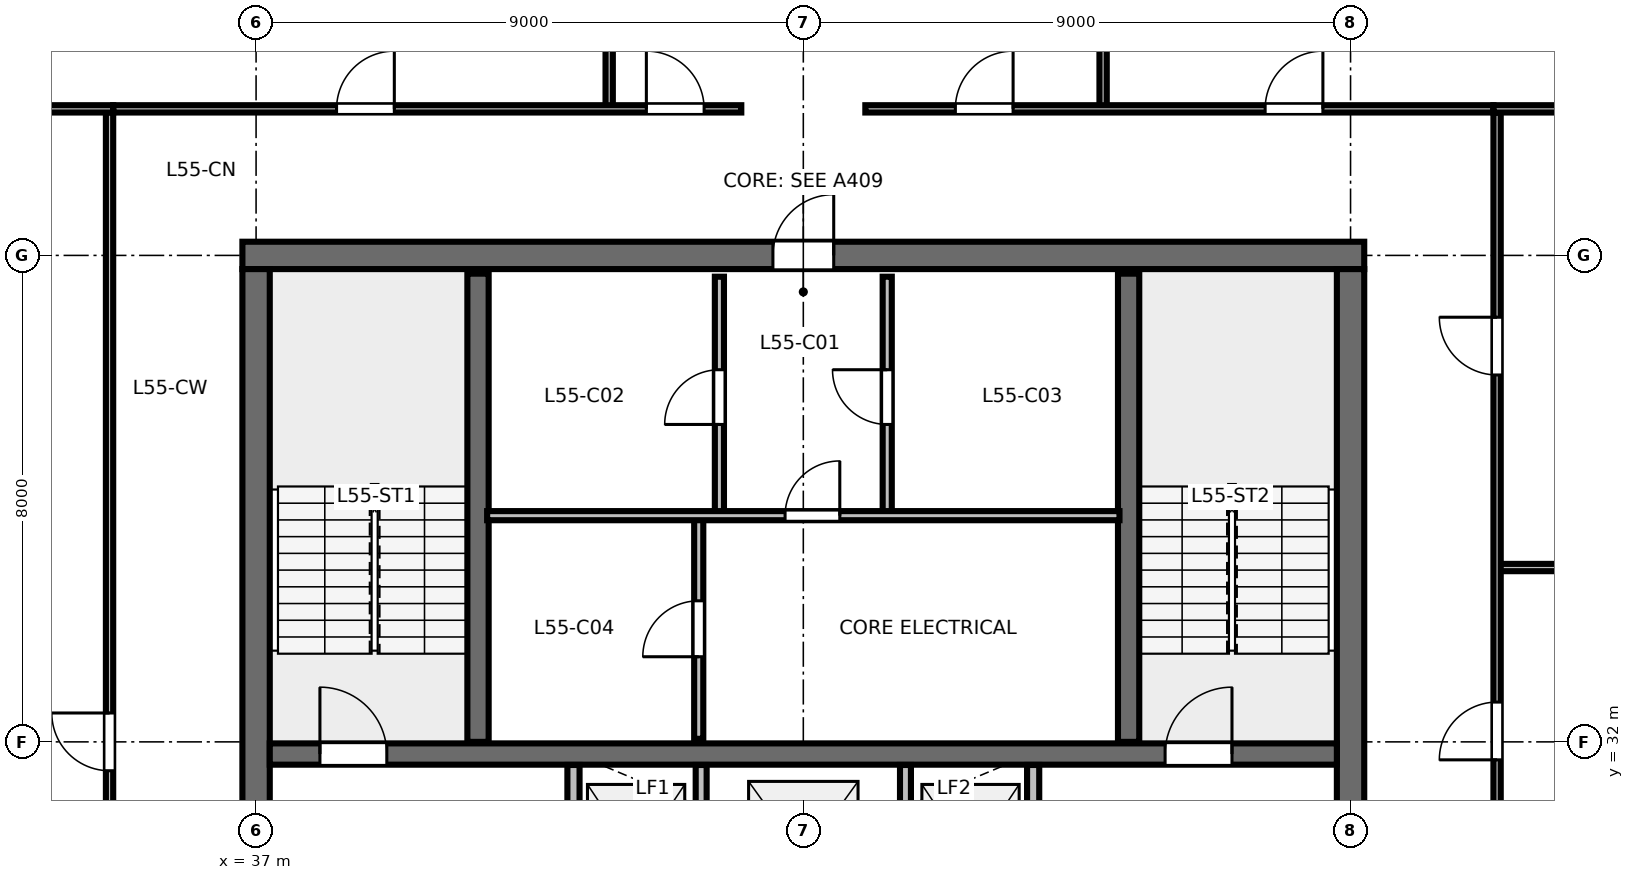
"""IFC4 building model, lengths in metres.
Left out: names, types, materials, properties, quantities, classifications, styles, units other than length and angle.
Written with IfcOpenShell. Run it as: python <this file> out.ifc"""

import sys

from ifc_helpers import new_model, si_unit, direction, frame, frame_2d, origin, place, context, subcontext, project, spatial, rectangle, extrude, element, fill, save


model = new_model("IFC4")
c1 = context("Model", 3, precision=1e-05, world=origin(), true_north=direction((0.0, 1.0)))
c2 = subcontext(c1, "Body", "Model", "MODEL_VIEW")
j1 = project(units=[si_unit("LENGTHUNIT", "METRE"), si_unit("PLANEANGLEUNIT", "RADIAN")], contexts=[c1])
p1 = place(None, origin())
s1 = spatial("IfcSite", under=j1, at=p1, CompositionType="ELEMENT")
p2 = place(p1, origin())
s2 = spatial("IfcBuilding", under=s1, at=p2, CompositionType="ELEMENT")
p3 = place(p2, frame((0.0, 0.0, 209.4)))
s3 = spatial("IfcBuildingStorey", under=s2, at=p3, CompositionType="ELEMENT", Elevation=209.4)
p4 = place(p3, frame((36.775, 40.0, 0.0), z_axis=(0.0, 0.0, 1.0), x_axis=(1.0, 0.0, 0.0)))
e1 = element("IfcWall", 1, at=p4, inside=s3, PredefinedType="SHEAR", context=c2, shape_type="SweptSolid", body=[
    extrude(rectangle(XDim=18.45, YDim=0.45, at=frame_2d((9.225, 0.0))), origin(), (0.0, 0.0, 1.0), 3.36),
])
p5 = place(p4, frame((8.725, 0.0, 0.0)))
e2 = element("IfcOpeningElement", 2, at=p5, cuts=e1, PredefinedType="OPENING", context=c2, shape_type="SweptSolid", body=[
    extrude(rectangle(XDim=1.0, YDim=2.15, at=frame_2d((0.5, 1.075))), frame((0.0, 0.235, 0.0), z_axis=(0.0, -1.0, 0.0), x_axis=(1.0, 0.0, 0.0)), (0.0, 0.0, 1.0), 0.47),
])
p6 = place(p3, frame((37.0, 24.225, 0.0), z_axis=(0.0, 0.0, 1.0), x_axis=(0.0, 1.0, 0.0)))
e3 = element("IfcWall", 3, at=p6, inside=s3, PredefinedType="SHEAR", context=c2, shape_type="SweptSolid", body=[
    extrude(rectangle(XDim=15.55, YDim=0.45, at=frame_2d((7.775, 0.0))), origin(), (0.0, 0.0, 1.0), 3.36),
])
p7 = place(p6, frame((5.3, 0.0, 0.0)))
e4 = element("IfcOpeningElement", 4, at=p7, cuts=e3, PredefinedType="OPENING", context=c2, shape_type="SweptSolid", body=[
    extrude(rectangle(XDim=1.15, YDim=2.15, at=frame_2d((0.575, 1.075))), frame((0.0, 0.235, 0.0), z_axis=(0.0, -1.0, 0.0), x_axis=(1.0, 0.0, 0.0)), (0.0, 0.0, 1.0), 0.47),
])
p8 = place(p3, frame((55.0, 24.225, 0.0), z_axis=(0.0, 0.0, 1.0), x_axis=(0.0, 1.0, 0.0)))
e5 = element("IfcWall", 5, at=p8, inside=s3, PredefinedType="SHEAR", context=c2, shape_type="SweptSolid", body=[
    extrude(rectangle(XDim=15.55, YDim=0.45, at=frame_2d((7.775, 0.0))), origin(), (0.0, 0.0, 1.0), 3.36),
])
p9 = place(p8, frame((5.3, 0.0, 0.0)))
e6 = element("IfcOpeningElement", 6, at=p9, cuts=e5, PredefinedType="OPENING", context=c2, shape_type="SweptSolid", body=[
    extrude(rectangle(XDim=1.15, YDim=2.15, at=frame_2d((0.575, 1.075))), frame((0.0, 0.235, 0.0), z_axis=(0.0, -1.0, 0.0), x_axis=(1.0, 0.0, 0.0)), (0.0, 0.0, 1.0), 0.47),
])
p10 = place(p3, frame((37.225, 31.8, 0.0), z_axis=(0.0, 0.0, 1.0), x_axis=(1.0, 0.0, 0.0)))
e7 = element("IfcWall", 7, at=p10, inside=s3, PredefinedType="SHEAR", context=c2, shape_type="SweptSolid", body=[
    extrude(rectangle(XDim=17.55, YDim=0.35, at=frame_2d((8.775, 0.0))), origin(), (0.0, 0.0, 1.0), 3.36),
])
p11 = place(p10, frame((0.825, 0.0, 0.0)))
e8 = element("IfcOpeningElement", 8, at=p11, cuts=e7, PredefinedType="OPENING", context=c2, shape_type="SweptSolid", body=[
    extrude(rectangle(XDim=1.1, YDim=2.15, at=frame_2d((0.55, 1.075))), frame((0.0, 0.185, 0.0), z_axis=(0.0, -1.0, 0.0), x_axis=(1.0, 0.0, 0.0)), (0.0, 0.0, 1.0), 0.37),
])
p12 = place(p10, frame((14.725, 0.0, 0.0)))
e9 = element("IfcOpeningElement", 9, at=p12, cuts=e7, PredefinedType="OPENING", context=c2, shape_type="SweptSolid", body=[
    extrude(rectangle(XDim=1.1, YDim=2.15, at=frame_2d((0.55, 1.075))), frame((0.0, 0.185, 0.0), z_axis=(0.0, -1.0, 0.0), x_axis=(1.0, 0.0, 0.0)), (0.0, 0.0, 1.0), 0.37),
])
for number, where, z_axis, x_axis in (
    (10, (40.65, 32.0, 0.0), (0.0, 0.0, 1.0), (0.0, 1.0, 0.0)),
    (11, (51.35, 32.0, 0.0), (0.0, 0.0, 1.0), (0.0, 1.0, 0.0)),
):
    element("IfcWall", number, at=place(p3, frame(where, z_axis=z_axis, x_axis=x_axis)), inside=s3, PredefinedType="SHEAR", context=c2, shape_type="SweptSolid", body=[
        extrude(rectangle(XDim=7.7, YDim=0.35, at=frame_2d((3.85, 0.0))), origin(), (0.0, 0.0, 1.0), 3.6),
    ])
p13 = place(p3, frame((44.62, 35.72, 0.0), z_axis=(0.0, 0.0, 1.0), x_axis=(0.0, 1.0, 0.0)))
e12 = element("IfcWall", 12, at=p13, inside=s3, PredefinedType="PARTITIONING", context=c2, shape_type="SweptSolid", body=[
    extrude(rectangle(XDim=3.93, YDim=0.15, at=frame_2d((1.965, 0.0))), origin(), (0.0, 0.0, 1.0), 3.375),
])
p14 = place(p13, frame((1.5, 0.0, 0.0)))
e13 = element("IfcOpeningElement", 13, at=p14, cuts=e12, PredefinedType="OPENING", context=c2, shape_type="SweptSolid", body=[
    extrude(rectangle(XDim=0.9, YDim=2.15, at=frame_2d((0.45, 1.075))), frame((0.0, 0.085, 0.0), z_axis=(0.0, -1.0, 0.0), x_axis=(1.0, 0.0, 0.0)), (0.0, 0.0, 1.0), 0.17),
])
p15 = place(p3, frame((47.38, 35.72, 0.0), z_axis=(0.0, 0.0, 1.0), x_axis=(0.0, 1.0, 0.0)))
e14 = element("IfcWall", 14, at=p15, inside=s3, PredefinedType="PARTITIONING", context=c2, shape_type="SweptSolid", body=[
    extrude(rectangle(XDim=3.93, YDim=0.15, at=frame_2d((1.965, 0.0))), origin(), (0.0, 0.0, 1.0), 3.375),
])
p16 = place(p15, frame((1.5, 0.0, 0.0)))
e15 = element("IfcOpeningElement", 15, at=p16, cuts=e14, PredefinedType="OPENING", context=c2, shape_type="SweptSolid", body=[
    extrude(rectangle(XDim=0.9, YDim=2.15, at=frame_2d((0.45, 1.075))), frame((0.0, 0.085, 0.0), z_axis=(0.0, -1.0, 0.0), x_axis=(1.0, 0.0, 0.0)), (0.0, 0.0, 1.0), 0.17),
])
p17 = place(p3, frame((44.28, 32.05, 0.0), z_axis=(0.0, 0.0, 1.0), x_axis=(0.0, 1.0, 0.0)))
e16 = element("IfcWall", 16, at=p17, inside=s3, PredefinedType="PARTITIONING", context=c2, shape_type="SweptSolid", body=[
    extrude(rectangle(XDim=3.67, YDim=0.15, at=frame_2d((1.835, 0.0))), origin(), (0.0, 0.0, 1.0), 3.375),
])
p18 = place(p17, frame((1.35, 0.0, 0.0)))
e17 = element("IfcOpeningElement", 17, at=p18, cuts=e16, PredefinedType="OPENING", context=c2, shape_type="SweptSolid", body=[
    extrude(rectangle(XDim=0.92, YDim=2.15, at=frame_2d((0.46, 1.075))), frame((0.0, 0.085, 0.0), z_axis=(0.0, -1.0, 0.0), x_axis=(1.0, 0.0, 0.0)), (0.0, 0.0, 1.0), 0.17),
])
p19 = place(p3, frame((40.8, 35.72, 0.0), z_axis=(0.0, 0.0, 1.0), x_axis=(1.0, 0.0, 0.0)))
e18 = element("IfcWall", 18, at=p19, inside=s3, PredefinedType="PARTITIONING", context=c2, shape_type="SweptSolid", body=[
    extrude(rectangle(XDim=10.4, YDim=0.15, at=frame_2d((5.2, 0.0))), origin(), (0.0, 0.0, 1.0), 3.375),
])
p20 = place(p19, frame((4.9, 0.0, 0.0)))
e19 = element("IfcOpeningElement", 19, at=p20, cuts=e18, PredefinedType="OPENING", context=c2, shape_type="SweptSolid", body=[
    extrude(rectangle(XDim=0.9, YDim=2.15, at=frame_2d((0.45, 1.075))), frame((0.0, 0.085, 0.0), z_axis=(0.0, -1.0, 0.0), x_axis=(1.0, 0.0, 0.0)), (0.0, 0.0, 1.0), 0.17),
])
p21 = place(p3, frame((42.22, 28.58, 0.0), z_axis=(0.0, 0.0, 1.0), x_axis=(0.0, 1.0, 0.0)))
e20 = element("IfcWall", 20, at=p21, inside=s3, PredefinedType="PARTITIONING", context=c2, shape_type="SweptSolid", body=[
    extrude(rectangle(XDim=3.04, YDim=0.2, at=frame_2d((1.52, 0.0))), origin(), (0.0, 0.0, 1.0), 3.375),
])
p22 = place(p21, frame((0.95, 0.0, 0.0)))
e21 = element("IfcOpeningElement", 21, at=p22, cuts=e20, PredefinedType="OPENING", context=c2, shape_type="SweptSolid", body=[
    extrude(rectangle(XDim=1.05, YDim=2.15, at=frame_2d((0.525, 1.075))), frame((0.0, 0.11, 0.0), z_axis=(0.0, -1.0, 0.0), x_axis=(1.0, 0.0, 0.0)), (0.0, 0.0, 1.0), 0.22),
])
p23 = place(p3, frame((49.78, 28.58, 0.0), z_axis=(0.0, 0.0, 1.0), x_axis=(0.0, 1.0, 0.0)))
e22 = element("IfcWall", 22, at=p23, inside=s3, PredefinedType="PARTITIONING", context=c2, shape_type="SweptSolid", body=[
    extrude(rectangle(XDim=3.04, YDim=0.2, at=frame_2d((1.52, 0.0))), origin(), (0.0, 0.0, 1.0), 3.375),
])
p24 = place(p23, frame((0.95, 0.0, 0.0)))
e23 = element("IfcOpeningElement", 23, at=p24, cuts=e22, PredefinedType="OPENING", context=c2, shape_type="SweptSolid", body=[
    extrude(rectangle(XDim=1.05, YDim=2.15, at=frame_2d((0.525, 1.075))), frame((0.0, 0.11, 0.0), z_axis=(0.0, -1.0, 0.0), x_axis=(1.0, 0.0, 0.0)), (0.0, 0.0, 1.0), 0.22),
])
for number, where, z_axis, x_axis in (
    (24, (44.32, 28.58, 0.0), (0.0, 0.0, 1.0), (0.0, 1.0, 0.0)),
    (25, (47.68, 28.58, 0.0), (0.0, 0.0, 1.0), (0.0, 1.0, 0.0)),
):
    element("IfcWall", number, at=place(p3, frame(where, z_axis=z_axis, x_axis=x_axis)), inside=s3, PredefinedType="PARTITIONING", context=c2, shape_type="SweptSolid", body=[
        extrude(rectangle(XDim=3.04, YDim=0.18, at=frame_2d((1.52, 0.0))), origin(), (0.0, 0.0, 1.0), 3.375),
    ])
p25 = place(p3, frame((42.807, 42.41, 0.0), z_axis=(0.0, 0.0, 1.0), x_axis=(0.0, 1.0, 0.0)))
e26 = element("IfcWall", 26, at=p25, inside=s3, PredefinedType="PARTITIONING", context=c2, shape_type="SweptSolid", body=[
    extrude(rectangle(XDim=7.574, YDim=0.12, at=frame_2d((3.787, 0.0))), origin(), (0.0, 0.0, 1.0), 2.655),
])
p26 = place(p25, frame((1.4, 0.0, 0.0)))
e27 = element("IfcOpeningElement", 27, at=p26, cuts=e26, PredefinedType="OPENING", context=c2, shape_type="SweptSolid", body=[
    extrude(rectangle(XDim=0.9, YDim=2.15, at=frame_2d((0.45, 1.075))), frame((0.0, 0.07, 0.0), z_axis=(0.0, -1.0, 0.0), x_axis=(1.0, 0.0, 0.0)), (0.0, 0.0, 1.0), 0.14),
])
p27 = place(p3, frame((50.93, 42.41, 0.0), z_axis=(0.0, 0.0, 1.0), x_axis=(0.0, 1.0, 0.0)))
e28 = element("IfcWall", 28, at=p27, inside=s3, PredefinedType="PARTITIONING", context=c2, shape_type="SweptSolid", body=[
    extrude(rectangle(XDim=7.574, YDim=0.12, at=frame_2d((3.787, 0.0))), origin(), (0.0, 0.0, 1.0), 2.655),
])
p28 = place(p27, frame((1.4, 0.0, 0.0)))
e29 = element("IfcOpeningElement", 29, at=p28, cuts=e28, PredefinedType="OPENING", context=c2, shape_type="SweptSolid", body=[
    extrude(rectangle(XDim=0.9, YDim=2.15, at=frame_2d((0.45, 1.075))), frame((0.0, 0.07, 0.0), z_axis=(0.0, -1.0, 0.0), x_axis=(1.0, 0.0, 0.0)), (0.0, 0.0, 1.0), 0.14),
])
p29 = place(p3, frame((34.65, 42.41, 0.0), z_axis=(0.0, 0.0, 1.0), x_axis=(1.0, 0.0, 0.0)))
e30 = element("IfcWall", 30, at=p29, inside=s3, PredefinedType="PARTITIONING", context=c2, shape_type="SweptSolid", body=[
    extrude(rectangle(XDim=10.33, YDim=0.12, at=frame_2d((5.165, 0.0))), origin(), (0.0, 0.0, 1.0), 2.655),
])
p30 = place(p29, frame((3.674, 0.0, 0.0)))
e31 = element("IfcOpeningElement", 31, at=p30, cuts=e30, PredefinedType="OPENING", context=c2, shape_type="SweptSolid", body=[
    extrude(rectangle(XDim=0.95, YDim=2.15, at=frame_2d((0.475, 1.075))), frame((0.0, 0.07, 0.0), z_axis=(0.0, -1.0, 0.0), x_axis=(1.0, 0.0, 0.0)), (0.0, 0.0, 1.0), 0.14),
])
p31 = place(p29, frame((8.769, 0.0, 0.0)))
e32 = element("IfcOpeningElement", 32, at=p31, cuts=e30, PredefinedType="OPENING", context=c2, shape_type="SweptSolid", body=[
    extrude(rectangle(XDim=0.95, YDim=2.15, at=frame_2d((0.475, 1.075))), frame((0.0, 0.07, 0.0), z_axis=(0.0, -1.0, 0.0), x_axis=(1.0, 0.0, 0.0)), (0.0, 0.0, 1.0), 0.14),
])
p32 = place(p3, frame((47.02, 42.41, 0.0), z_axis=(0.0, 0.0, 1.0), x_axis=(1.0, 0.0, 0.0)))
e33 = element("IfcWall", 33, at=p32, inside=s3, PredefinedType="PARTITIONING", context=c2, shape_type="SweptSolid", body=[
    extrude(rectangle(XDim=10.33, YDim=0.12, at=frame_2d((5.165, 0.0))), origin(), (0.0, 0.0, 1.0), 2.655),
])
p33 = place(p32, frame((1.48, 0.0, 0.0)))
e34 = element("IfcOpeningElement", 34, at=p33, cuts=e33, PredefinedType="OPENING", context=c2, shape_type="SweptSolid", body=[
    extrude(rectangle(XDim=0.95, YDim=2.15, at=frame_2d((0.475, 1.075))), frame((0.0, 0.07, 0.0), z_axis=(0.0, -1.0, 0.0), x_axis=(1.0, 0.0, 0.0)), (0.0, 0.0, 1.0), 0.14),
])
p34 = place(p32, frame((6.575, 0.0, 0.0)))
e35 = element("IfcOpeningElement", 35, at=p34, cuts=e33, PredefinedType="OPENING", context=c2, shape_type="SweptSolid", body=[
    extrude(rectangle(XDim=0.95, YDim=2.15, at=frame_2d((0.475, 1.075))), frame((0.0, 0.07, 0.0), z_axis=(0.0, -1.0, 0.0), x_axis=(1.0, 0.0, 0.0)), (0.0, 0.0, 1.0), 0.14),
])
p35 = place(p3, frame((34.59, 21.65, 0.0), z_axis=(0.0, 0.0, 1.0), x_axis=(0.0, 1.0, 0.0)))
e36 = element("IfcWall", 36, at=p35, inside=s3, PredefinedType="PARTITIONING", context=c2, shape_type="SweptSolid", body=[
    extrude(rectangle(XDim=20.7, YDim=0.12, at=frame_2d((10.35, 0.0))), origin(), (0.0, 0.0, 1.0), 2.655),
])
p36 = place(p35, frame((9.875, 0.0, 0.0)))
e37 = element("IfcOpeningElement", 37, at=p36, cuts=e36, PredefinedType="OPENING", context=c2, shape_type="SweptSolid", body=[
    extrude(rectangle(XDim=0.95, YDim=2.15, at=frame_2d((0.475, 1.075))), frame((0.0, 0.07, 0.0), z_axis=(0.0, -1.0, 0.0), x_axis=(1.0, 0.0, 0.0)), (0.0, 0.0, 1.0), 0.14),
])
p37 = place(p3, frame((57.41, 34.867, 0.0), z_axis=(0.0, 0.0, 1.0), x_axis=(1.0, 0.0, 0.0)))
e38 = element("IfcWall", 38, at=p37, inside=s3, PredefinedType="PARTITIONING", context=c2, shape_type="SweptSolid", body=[
    extrude(rectangle(XDim=8.796, YDim=0.12, at=frame_2d((4.398, 0.0))), origin(), (0.0, 0.0, 1.0), 2.655),
])
p38 = place(p37, frame((1.4, 0.0, 0.0)))
e39 = element("IfcOpeningElement", 39, at=p38, cuts=e38, PredefinedType="OPENING", context=c2, shape_type="SweptSolid", body=[
    extrude(rectangle(XDim=0.9, YDim=2.15, at=frame_2d((0.45, 1.075))), frame((0.0, 0.07, 0.0), z_axis=(0.0, -1.0, 0.0), x_axis=(1.0, 0.0, 0.0)), (0.0, 0.0, 1.0), 0.14),
])
p39 = place(p3, frame((57.41, 21.65, 0.0), z_axis=(0.0, 0.0, 1.0), x_axis=(0.0, 1.0, 0.0)))
e40 = element("IfcWall", 40, at=p39, inside=s3, PredefinedType="PARTITIONING", context=c2, shape_type="SweptSolid", body=[
    extrude(rectangle(XDim=20.7, YDim=0.12, at=frame_2d((10.35, 0.0))), origin(), (0.0, 0.0, 1.0), 2.655),
])
p40 = place(p39, frame((3.546, 0.0, 0.0)))
e41 = element("IfcOpeningElement", 41, at=p40, cuts=e40, PredefinedType="OPENING", context=c2, shape_type="SweptSolid", body=[
    extrude(rectangle(XDim=0.95, YDim=2.15, at=frame_2d((0.475, 1.075))), frame((0.0, 0.07, 0.0), z_axis=(0.0, -1.0, 0.0), x_axis=(1.0, 0.0, 0.0)), (0.0, 0.0, 1.0), 0.14),
])
p41 = place(p39, frame((10.054, 0.0, 0.0)))
e42 = element("IfcOpeningElement", 42, at=p41, cuts=e40, PredefinedType="OPENING", context=c2, shape_type="SweptSolid", body=[
    extrude(rectangle(XDim=0.95, YDim=2.15, at=frame_2d((0.475, 1.075))), frame((0.0, 0.07, 0.0), z_axis=(0.0, -1.0, 0.0), x_axis=(1.0, 0.0, 0.0)), (0.0, 0.0, 1.0), 0.14),
])
p42 = place(p39, frame((16.384, 0.0, 0.0)))
e43 = element("IfcOpeningElement", 43, at=p42, cuts=e40, PredefinedType="OPENING", context=c2, shape_type="SweptSolid", body=[
    extrude(rectangle(XDim=0.95, YDim=2.15, at=frame_2d((0.475, 1.075))), frame((0.0, 0.07, 0.0), z_axis=(0.0, -1.0, 0.0), x_axis=(1.0, 0.0, 0.0)), (0.0, 0.0, 1.0), 0.14),
])
for number, where, z_axis, x_axis in (
    (44, (34.65, 42.41, 0.0), (0.0, 0.0, 1.0), (-1.0, 0.0, 0.0)),
    (45, (57.35, 42.41, 0.0), (0.0, 0.0, 1.0), (1.0, 0.0, 0.0)),
):
    element("IfcWall", number, at=place(p3, frame(where, z_axis=z_axis, x_axis=x_axis)), inside=s3, PredefinedType="PARTITIONING", context=c2, shape_type="SweptSolid", body=[
        extrude(rectangle(XDim=8.856, YDim=0.12, at=frame_2d((4.428, 0.0))), origin(), (0.0, 0.0, 1.0), 2.655),
    ])
p43 = place(p11, origin())
e46 = element("IfcDoor", 46, at=p43, inside=s3, OperationType="SINGLE_SWING_LEFT", PredefinedType="DOOR", context=c2, shape_type="SweptSolid", body=[
    extrude(rectangle(XDim=1.1, YDim=2.15, at=frame_2d((0.55, 1.075))), frame((0.0, 0.025, 0.0), z_axis=(0.0, -1.0, 0.0), x_axis=(1.0, 0.0, 0.0)), (0.0, 0.0, 1.0), 0.05),
])
fill(e8, e46)
p44 = place(p12, origin())
e47 = element("IfcDoor", 47, at=p44, inside=s3, OperationType="SINGLE_SWING_RIGHT", PredefinedType="DOOR", context=c2, shape_type="SweptSolid", body=[
    extrude(rectangle(XDim=1.1, YDim=2.15, at=frame_2d((0.55, 1.075))), frame((0.0, 0.025, 0.0), z_axis=(0.0, -1.0, 0.0), x_axis=(1.0, 0.0, 0.0)), (0.0, 0.0, 1.0), 0.05),
])
fill(e9, e47)
p45 = place(p5, origin())
e48 = element("IfcDoor", 48, at=p45, inside=s3, OperationType="SINGLE_SWING_RIGHT", PredefinedType="DOOR", context=c2, shape_type="SweptSolid", body=[
    extrude(rectangle(XDim=1.0, YDim=2.15, at=frame_2d((0.5, 1.075))), frame((0.0, 0.025, 0.0), z_axis=(0.0, -1.0, 0.0), x_axis=(1.0, 0.0, 0.0)), (0.0, 0.0, 1.0), 0.05),
])
fill(e2, e48)
p46 = place(p14, origin())
e49 = element("IfcDoor", 49, at=p46, inside=s3, OperationType="SINGLE_SWING_LEFT", PredefinedType="DOOR", context=c2, shape_type="SweptSolid", body=[
    extrude(rectangle(XDim=0.9, YDim=2.15, at=frame_2d((0.45, 1.075))), frame((0.0, 0.025, 0.0), z_axis=(0.0, -1.0, 0.0), x_axis=(1.0, 0.0, 0.0)), (0.0, 0.0, 1.0), 0.05),
])
fill(e13, e49)
p47 = place(p16, origin())
e50 = element("IfcDoor", 50, at=p47, inside=s3, OperationType="SINGLE_SWING_RIGHT", PredefinedType="DOOR", context=c2, shape_type="SweptSolid", body=[
    extrude(rectangle(XDim=0.9, YDim=2.15, at=frame_2d((0.45, 1.075))), frame((0.0, 0.025, 0.0), z_axis=(0.0, -1.0, 0.0), x_axis=(1.0, 0.0, 0.0)), (0.0, 0.0, 1.0), 0.05),
])
fill(e15, e50)
p48 = place(p18, origin())
e51 = element("IfcDoor", 51, at=p48, inside=s3, OperationType="SINGLE_SWING_LEFT", PredefinedType="DOOR", context=c2, shape_type="SweptSolid", body=[
    extrude(rectangle(XDim=0.92, YDim=2.15, at=frame_2d((0.46, 1.075))), frame((0.0, 0.025, 0.0), z_axis=(0.0, -1.0, 0.0), x_axis=(1.0, 0.0, 0.0)), (0.0, 0.0, 1.0), 0.05),
])
fill(e17, e51)
p49 = place(p20, origin())
e52 = element("IfcDoor", 52, at=p49, inside=s3, OperationType="SINGLE_SWING_RIGHT", PredefinedType="DOOR", context=c2, shape_type="SweptSolid", body=[
    extrude(rectangle(XDim=0.9, YDim=2.15, at=frame_2d((0.45, 1.075))), frame((0.0, 0.025, 0.0), z_axis=(0.0, -1.0, 0.0), x_axis=(1.0, 0.0, 0.0)), (0.0, 0.0, 1.0), 0.05),
])
fill(e19, e52)
p50 = place(p30, origin())
e53 = element("IfcDoor", 53, at=p50, inside=s3, OperationType="SINGLE_SWING_RIGHT", PredefinedType="DOOR", context=c2, shape_type="SweptSolid", body=[
    extrude(rectangle(XDim=0.95, YDim=2.15, at=frame_2d((0.475, 1.075))), frame((0.0, 0.025, 0.0), z_axis=(0.0, -1.0, 0.0), x_axis=(1.0, 0.0, 0.0)), (0.0, 0.0, 1.0), 0.05),
])
fill(e31, e53)
p51 = place(p31, origin())
e54 = element("IfcDoor", 54, at=p51, inside=s3, OperationType="SINGLE_SWING_LEFT", PredefinedType="DOOR", context=c2, shape_type="SweptSolid", body=[
    extrude(rectangle(XDim=0.95, YDim=2.15, at=frame_2d((0.475, 1.075))), frame((0.0, 0.025, 0.0), z_axis=(0.0, -1.0, 0.0), x_axis=(1.0, 0.0, 0.0)), (0.0, 0.0, 1.0), 0.05),
])
fill(e32, e54)
p52 = place(p33, origin())
e55 = element("IfcDoor", 55, at=p52, inside=s3, OperationType="SINGLE_SWING_RIGHT", PredefinedType="DOOR", context=c2, shape_type="SweptSolid", body=[
    extrude(rectangle(XDim=0.95, YDim=2.15, at=frame_2d((0.475, 1.075))), frame((0.0, 0.025, 0.0), z_axis=(0.0, -1.0, 0.0), x_axis=(1.0, 0.0, 0.0)), (0.0, 0.0, 1.0), 0.05),
])
fill(e34, e55)
p53 = place(p34, origin())
e56 = element("IfcDoor", 56, at=p53, inside=s3, OperationType="SINGLE_SWING_RIGHT", PredefinedType="DOOR", context=c2, shape_type="SweptSolid", body=[
    extrude(rectangle(XDim=0.95, YDim=2.15, at=frame_2d((0.475, 1.075))), frame((0.0, 0.025, 0.0), z_axis=(0.0, -1.0, 0.0), x_axis=(1.0, 0.0, 0.0)), (0.0, 0.0, 1.0), 0.05),
])
fill(e35, e56)
p54 = place(p36, origin())
e57 = element("IfcDoor", 57, at=p54, inside=s3, OperationType="SINGLE_SWING_RIGHT", PredefinedType="DOOR", context=c2, shape_type="SweptSolid", body=[
    extrude(rectangle(XDim=0.95, YDim=2.15, at=frame_2d((0.475, 1.075))), frame((0.0, 0.025, 0.0), z_axis=(0.0, -1.0, 0.0), x_axis=(1.0, 0.0, 0.0)), (0.0, 0.0, 1.0), 0.05),
])
fill(e37, e57)
p55 = place(p41, origin())
e58 = element("IfcDoor", 58, at=p55, inside=s3, OperationType="SINGLE_SWING_LEFT", PredefinedType="DOOR", context=c2, shape_type="SweptSolid", body=[
    extrude(rectangle(XDim=0.95, YDim=2.15, at=frame_2d((0.475, 1.075))), frame((0.0, 0.025, 0.0), z_axis=(0.0, -1.0, 0.0), x_axis=(1.0, 0.0, 0.0)), (0.0, 0.0, 1.0), 0.05),
])
fill(e42, e58)
p56 = place(p42, origin())
e59 = element("IfcDoor", 59, at=p56, inside=s3, OperationType="SINGLE_SWING_RIGHT", PredefinedType="DOOR", context=c2, shape_type="SweptSolid", body=[
    extrude(rectangle(XDim=0.95, YDim=2.15, at=frame_2d((0.475, 1.075))), frame((0.0, 0.025, 0.0), z_axis=(0.0, -1.0, 0.0), x_axis=(1.0, 0.0, 0.0)), (0.0, 0.0, 1.0), 0.05),
])
fill(e43, e59)
save(model, sys.argv[1])
